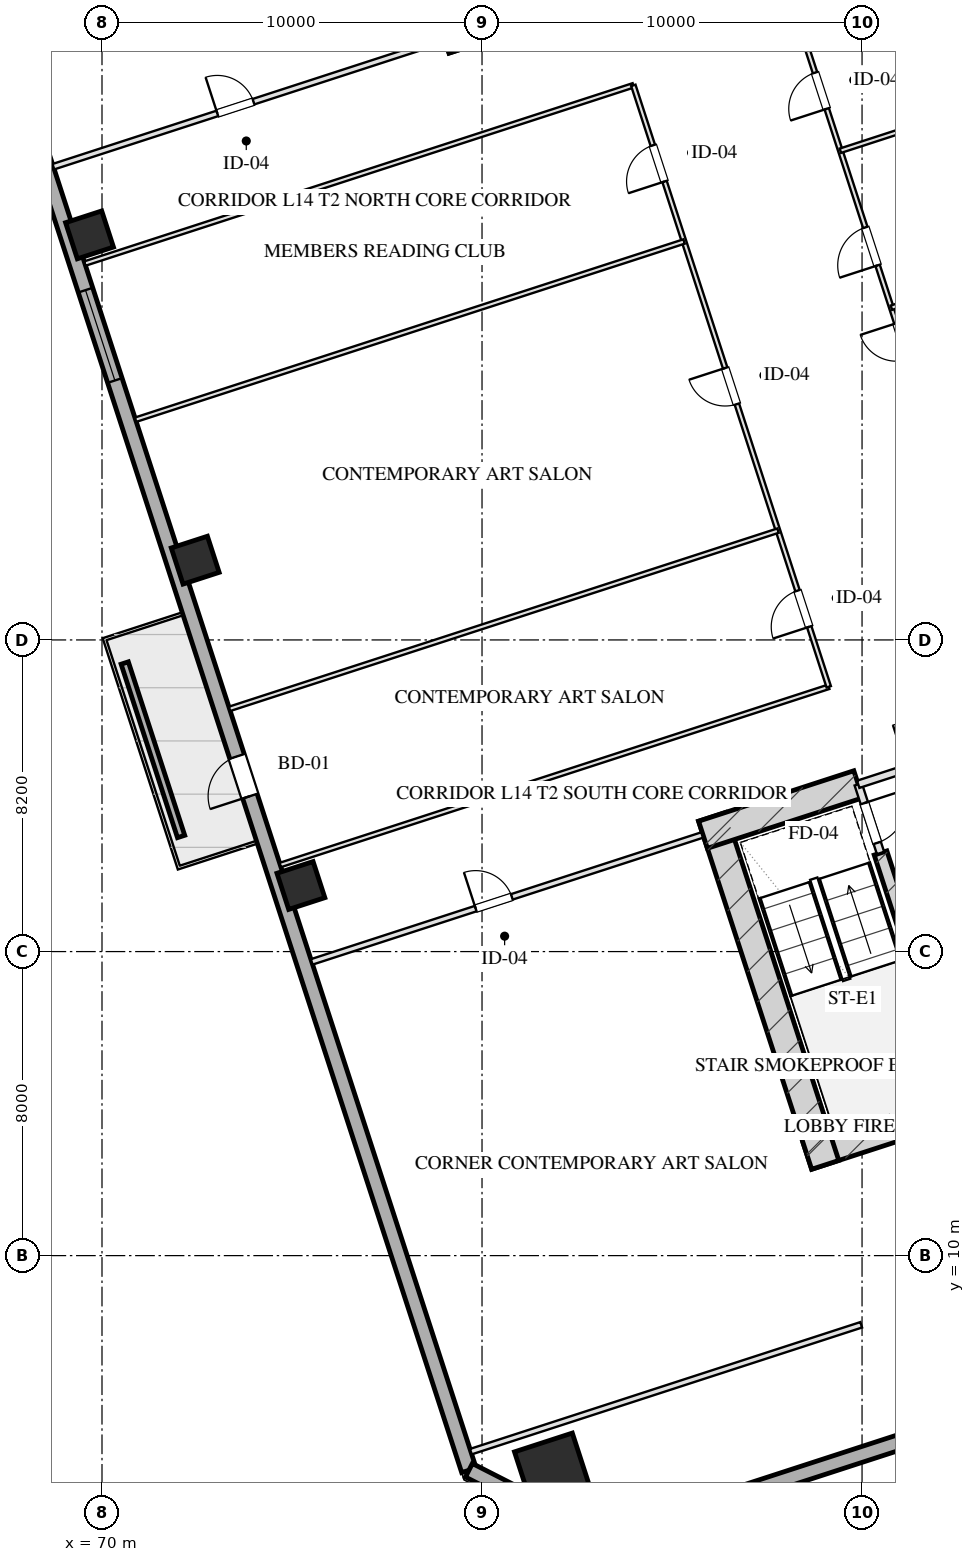
"""IFC4 building model, lengths in metres.
Left out: names, types, materials, properties, quantities, classifications, styles, units other than length and angle.
Written with IfcOpenShell. Run it as: python <this file> out.ifc"""

import sys

from ifc_helpers import new_model, si_unit, direction, frame, frame_2d, origin, origin_2d, place, context, subcontext, project, spatial, rectangle, hollow_rectangle, extrude, element, fill, save


model = new_model("IFC4")
c1 = context("Model", 3, precision=1e-05, world=origin(), true_north=direction((0.0, 1.0)))
c2 = subcontext(c1, "Body", "Model", "MODEL_VIEW")
j1 = project(units=[si_unit("LENGTHUNIT", "METRE"), si_unit("PLANEANGLEUNIT", "RADIAN")], contexts=[c1])
p1 = place(None, origin())
s1 = spatial("IfcSite", under=j1, at=p1, CompositionType="ELEMENT")
p2 = place(p1, origin())
s2 = spatial("IfcBuilding", under=s1, at=p2, CompositionType="ELEMENT")
p3 = place(p2, frame((0.0, 0.0, 60.95)))
s3 = spatial("IfcBuildingStorey", under=s2, at=p3, CompositionType="ELEMENT", Elevation=60.95)
p4 = place(p3, frame((88.559, 12.629, 0.0), z_axis=(0.0, 0.0, 1.0), x_axis=(0.951056072937, 0.309018358888, 0.0)))
e1 = element("IfcWall", 1, at=p4, inside=s3, PredefinedType="SHEAR", context=c2, shape_type="SweptSolid", body=[
    extrude(rectangle(XDim=16.55, YDim=0.75, at=frame_2d((8.275, 0.0))), origin(), (0.0, 0.0, 1.0), 3.45),
])
p5 = place(p3, frame((86.055, 21.546, 0.0), z_axis=(0.0, 0.0, 1.0), x_axis=(0.309023585745, -0.951054374604, 0.0)))
e2 = element("IfcWall", 2, at=p5, inside=s3, PredefinedType="SHEAR", context=c2, shape_type="SweptSolid", body=[
    extrude(rectangle(XDim=9.63, YDim=0.75, at=frame_2d((4.815, 0.0))), origin(), (0.0, 0.0, 1.0), 3.45),
])
p6 = place(p3, frame((90.486, 20.594, 0.0), z_axis=(0.0, 0.0, 1.0), x_axis=(0.309020428229, -0.951055400562, 0.0)))
e3 = element("IfcWall", 3, at=p6, inside=s3, PredefinedType="SHEAR", context=c2, shape_type="SweptSolid", body=[
    extrude(rectangle(XDim=6.98, YDim=0.35, at=frame_2d((3.49, 0.0))), origin(), (0.0, 0.0, 1.0), 3.45),
])
p7 = place(p3, frame((85.814, 21.074, 0.0), z_axis=(0.0, 0.0, 1.0), x_axis=(0.95106580992, 0.308988390074, 0.0)))
e4 = element("IfcWall", 4, at=p7, inside=s3, PredefinedType="SHEAR", context=c2, shape_type="SweptSolid", body=[
    extrude(rectangle(XDim=4.295, YDim=0.75, at=frame_2d((2.147, 0.0))), origin(), (0.0, 0.0, 1.0), 3.45),
])
p8 = place(p3, frame((79.489, 41.756, 0.0), z_axis=(0.0, 0.0, 1.0), x_axis=(-0.309016134813, 0.951056795583, 0.0)))
e5 = element("IfcWall", 5, at=p8, inside=s3, PredefinedType="SHEAR", context=c2, shape_type="SweptSolid", body=[
    extrude(rectangle(XDim=9.63, YDim=0.75, at=frame_2d((4.815, 0.0))), origin(), (0.0, 0.0, 1.0), 3.45),
])
p9 = place(p3, frame((79.016, 41.997, 0.0), z_axis=(0.0, 0.0, 1.0), x_axis=(0.95106038264, 0.309005094736, 0.0)))
e6 = element("IfcWall", 6, at=p9, inside=s3, PredefinedType="SHEAR", context=c2, shape_type="SweptSolid", body=[
    extrude(rectangle(XDim=4.295, YDim=0.75, at=frame_2d((2.147, 0.0))), origin(), (0.0, 0.0, 1.0), 3.45),
])
p10 = place(p3, frame((81.863, 4.323, 0.0), z_axis=(0.0, 0.0, 1.0), x_axis=(0.951056516295, 0.309016994375, 0.0)))
e7 = element("IfcColumn", 7, at=p10, inside=s3, PredefinedType="COLUMN", context=c2, shape_type="SweptSolid", body=[
    extrude(hollow_rectangle(XDim=1.6, YDim=1.6, WallThickness=0.055, at=origin_2d()), origin(), (0.0, 0.0, 1.0), 3.451),
])
for number, where, z_axis, x_axis in (
    (8, (75.234, 19.739, 0.0), (0.0, 0.0, 1.0), (0.951, 0.309, 0.0)),
    (9, (72.453, 28.299, 0.0), (0.0, 0.0, 1.0), (0.951, 0.309, 0.0)),
    (10, (69.672, 36.858, 0.0), (0.0, 0.0, 1.0), (0.951, 0.309, 0.0)),
):
    element("IfcColumn", number, at=place(p3, frame(where, z_axis=z_axis, x_axis=x_axis)), inside=s3, PredefinedType="COLUMN", context=c2, shape_type="SweptSolid", body=[
        extrude(hollow_rectangle(XDim=1.0, YDim=1.0, WallThickness=0.036, at=origin_2d()), origin(), (0.0, 0.0, 1.0), 3.451),
    ])
p11 = place(p3, frame((79.655, 4.352, 0.0), z_axis=(0.0, 0.0, 1.0), x_axis=(-0.309014526607, 0.951057318118, 0.0)))
e11 = element("IfcWall", 11, at=p11, inside=s3, PredefinedType="SOLIDWALL", context=c2, shape_type="SweptSolid", body=[
    extrude(rectangle(XDim=50.0, YDim=0.4, at=frame_2d((25.0, 0.0))), origin(), (0.0, 0.0, 1.0), 2.61),
])
p12 = place(p11, frame((30.15, 0.0, 0.75)))
e12 = element("IfcOpeningElement", 12, at=p12, cuts=e11, PredefinedType="OPENING", context=c2, shape_type="SweptSolid", body=[
    extrude(rectangle(XDim=2.5, YDim=1.46, at=frame_2d((1.25, 0.73))), frame((0.0, 0.21, 0.0), z_axis=(0.0, -1.0, 0.0), x_axis=(1.0, 0.0, 0.0)), (0.0, 0.0, 1.0), 0.42),
])
p13 = place(p11, frame((18.65, 0.0, 0.0)))
e13 = element("IfcOpeningElement", 13, at=p13, cuts=e11, PredefinedType="OPENING", context=c2, shape_type="SweptSolid", body=[
    extrude(rectangle(XDim=1.1, YDim=2.15, at=frame_2d((0.55, 1.075))), frame((0.0, 0.21, 0.0), z_axis=(0.0, -1.0, 0.0), x_axis=(1.0, 0.0, 0.0)), (0.0, 0.0, 1.0), 0.42),
])
p14 = place(p3, frame((113.998, 12.567, 0.0), z_axis=(0.0, 0.0, 1.0), x_axis=(-0.951055939317, -0.309018770125, 0.0)))
e14 = element("IfcWall", 14, at=p14, inside=s3, PredefinedType="SOLIDWALL", context=c2, shape_type="SweptSolid", body=[
    extrude(rectangle(XDim=32.4, YDim=0.4, at=frame_2d((16.2, 0.0))), origin(), (0.0, 0.0, 1.0), 2.61),
])
p15 = place(p3, frame((83.184, 2.554, 0.0), z_axis=(0.0, 0.0, 1.0), x_axis=(-0.890998089617, 0.454007053137, 0.0)))
e15 = element("IfcWall", 15, at=p15, inside=s3, PredefinedType="SOLIDWALL", context=c2, shape_type="SweptSolid", body=[
    extrude(rectangle(XDim=3.96, YDim=0.4, at=frame_2d((1.98, 0.0))), origin(), (0.0, 0.0, 1.0), 2.61),
])
p16 = place(p3, frame((72.082, 21.028, 0.0), z_axis=(0.0, 0.0, 1.0), x_axis=(-0.30900096172, 0.951061725471, 0.0)))
e16 = element("IfcWall", 16, at=p16, inside=s3, PredefinedType="PARAPET", context=c2, shape_type="SweptSolid", body=[
    extrude(rectangle(XDim=4.8, YDim=0.2, at=frame_2d((2.4, 0.0))), origin(), (0.0, 0.0, 1.0), 0.75),
])
p17 = place(p3, frame((89.899, 22.401, 0.0), z_axis=(0.0, 0.0, 1.0), x_axis=(0.308932062672, -0.951084108086, 0.0)))
e17 = element("IfcWall", 17, at=p17, inside=s3, PredefinedType="PARTITIONING", context=c2, shape_type="SweptSolid", body=[
    extrude(rectangle(XDim=1.9, YDim=0.2, at=frame_2d((0.95, 0.0))), origin(), (0.0, 0.0, 1.0), 3.175),
])
p18 = place(p17, frame((0.52, 0.0, 0.0)))
e18 = element("IfcOpeningElement", 18, at=p18, cuts=e17, PredefinedType="OPENING", context=c2, shape_type="SweptSolid", body=[
    extrude(rectangle(XDim=1.1, YDim=2.05, at=frame_2d((0.55, 1.025))), frame((0.0, 0.11, 0.0), z_axis=(0.0, -1.0, 0.0), x_axis=(1.0, 0.0, 0.0)), (0.0, 0.0, 1.0), 0.22),
])
p19 = place(p3, frame((89.899, 22.401, 0.0), z_axis=(0.0, 0.0, 1.0), x_axis=(0.951046716504, 0.309047153403, 0.0)))
e19 = element("IfcWall", 19, at=p19, inside=s3, PredefinedType="PARTITIONING", context=c2, shape_type="SweptSolid", body=[
    extrude(rectangle(XDim=3.83, YDim=0.2, at=frame_2d((1.915, 0.0))), origin(), (0.0, 0.0, 1.0), 3.175),
])
p20 = place(p19, frame((1.35, 0.0, 0.0)))
e20 = element("IfcOpeningElement", 20, at=p20, cuts=e19, PredefinedType="OPENING", context=c2, shape_type="SweptSolid", body=[
    extrude(rectangle(XDim=1.2, YDim=2.05, at=frame_2d((0.6, 1.025))), frame((0.0, 0.11, 0.0), z_axis=(0.0, -1.0, 0.0), x_axis=(1.0, 0.0, 0.0)), (0.0, 0.0, 1.0), 0.22),
])
p21 = place(p3, frame((79.707, 4.842, 0.0), z_axis=(0.0, 0.0, 1.0), x_axis=(0.951056658866, 0.309016555588, 0.0)))
e21 = element("IfcWall", 21, at=p21, inside=s3, PredefinedType="PARTITIONING", context=c2, shape_type="SweptSolid", body=[
    extrude(rectangle(XDim=10.8, YDim=0.15, at=frame_2d((5.4, 0.0))), origin(), (0.0, 0.0, 1.0), 3.175),
])
p22 = place(p3, frame((75.519, 17.729, 0.0), z_axis=(0.0, 0.0, 1.0), x_axis=(0.951056658866, 0.309016555588, 0.0)))
e22 = element("IfcWall", 22, at=p22, inside=s3, PredefinedType="PARTITIONING", context=c2, shape_type="SweptSolid", body=[
    extrude(rectangle(XDim=10.8, YDim=0.15, at=frame_2d((5.4, 0.0))), origin(), (0.0, 0.0, 1.0), 3.175),
])
p23 = place(p22, frame((4.536, 0.0, 0.0)))
e23 = element("IfcOpeningElement", 23, at=p23, cuts=e22, PredefinedType="OPENING", context=c2, shape_type="SweptSolid", body=[
    extrude(rectangle(XDim=1.0, YDim=2.05, at=frame_2d((0.5, 1.025))), frame((0.0, 0.085, 0.0), z_axis=(0.0, -1.0, 0.0), x_axis=(1.0, 0.0, 0.0)), (0.0, 0.0, 1.0), 0.17),
])
p24 = place(p3, frame((68.721, 38.652, 0.0), z_axis=(0.0, 0.0, 1.0), x_axis=(0.951056658866, 0.309016555588, 0.0)))
e24 = element("IfcWall", 24, at=p24, inside=s3, PredefinedType="PARTITIONING", context=c2, shape_type="SweptSolid", body=[
    extrude(rectangle(XDim=10.8, YDim=0.15, at=frame_2d((5.4, 0.0))), origin(), (0.0, 0.0, 1.0), 3.175),
])
p25 = place(p24, frame((4.536, 0.0, 0.0)))
e25 = element("IfcOpeningElement", 25, at=p25, cuts=e24, PredefinedType="OPENING", context=c2, shape_type="SweptSolid", body=[
    extrude(rectangle(XDim=1.0, YDim=2.05, at=frame_2d((0.5, 1.025))), frame((0.0, 0.085, 0.0), z_axis=(0.0, -1.0, 0.0), x_axis=(1.0, 0.0, 0.0)), (0.0, 0.0, 1.0), 0.17),
])
for number, where, z_axis, x_axis in (
    (26, (74.691, 20.278, 0.0), (0.0, 0.0, 1.0), (0.951, 0.309, 0.0)),
    (27, (69.549, 36.103, 0.0), (0.0, 0.0, 1.0), (0.951, 0.309, 0.0)),
):
    element("IfcWall", number, at=place(p3, frame(where, z_axis=z_axis, x_axis=x_axis)), inside=s3, PredefinedType="PARTITIONING", context=c2, shape_type="SweptSolid", body=[
        extrude(rectangle(XDim=15.175, YDim=0.12, at=frame_2d((7.587, 0.0))), origin(), (0.0, 0.0, 1.0), 3.175),
    ])
p26 = place(p3, frame((89.124, 24.967, 0.0), z_axis=(0.0, 0.0, 1.0), x_axis=(-0.30901773025, 0.951056277195, 0.0)))
e28 = element("IfcWall", 28, at=p26, inside=s3, PredefinedType="PARTITIONING", context=c2, shape_type="SweptSolid", body=[
    extrude(rectangle(XDim=16.64, YDim=0.12, at=frame_2d((8.32, 0.0))), origin(), (0.0, 0.0, 1.0), 3.175),
])
p27 = place(p26, frame((1.66, 0.0, 0.0)))
e29 = element("IfcOpeningElement", 29, at=p27, cuts=e28, PredefinedType="OPENING", context=c2, shape_type="SweptSolid", body=[
    extrude(rectangle(XDim=1.0, YDim=2.05, at=frame_2d((0.5, 1.025))), frame((0.0, 0.07, 0.0), z_axis=(0.0, -1.0, 0.0), x_axis=(1.0, 0.0, 0.0)), (0.0, 0.0, 1.0), 0.14),
])
p28 = place(p26, frame((7.82, 0.0, 0.0)))
e30 = element("IfcOpeningElement", 30, at=p28, cuts=e28, PredefinedType="OPENING", context=c2, shape_type="SweptSolid", body=[
    extrude(rectangle(XDim=1.0, YDim=2.05, at=frame_2d((0.5, 1.025))), frame((0.0, 0.07, 0.0), z_axis=(0.0, -1.0, 0.0), x_axis=(1.0, 0.0, 0.0)), (0.0, 0.0, 1.0), 0.14),
])
p29 = place(p26, frame((13.98, 0.0, 0.0)))
e31 = element("IfcOpeningElement", 31, at=p29, cuts=e28, PredefinedType="OPENING", context=c2, shape_type="SweptSolid", body=[
    extrude(rectangle(XDim=1.0, YDim=2.05, at=frame_2d((0.5, 1.025))), frame((0.0, 0.07, 0.0), z_axis=(0.0, -1.0, 0.0), x_axis=(1.0, 0.0, 0.0)), (0.0, 0.0, 1.0), 0.14),
])
p30 = place(p3, frame((93.546, 26.404, 0.0), z_axis=(0.0, 0.0, 1.0), x_axis=(-0.309022042254, 0.951054876125, 0.0)))
e32 = element("IfcWall", 32, at=p30, inside=s3, PredefinedType="PARTITIONING", context=c2, shape_type="SweptSolid", body=[
    extrude(rectangle(XDim=16.64, YDim=0.12, at=frame_2d((8.32, 0.0))), origin(), (0.0, 0.0, 1.0), 3.175),
])
p31 = place(p30, frame((1.16, 0.0, 0.0)))
e33 = element("IfcOpeningElement", 33, at=p31, cuts=e32, PredefinedType="OPENING", context=c2, shape_type="SweptSolid", body=[
    extrude(rectangle(XDim=1.0, YDim=2.05, at=frame_2d((0.5, 1.025))), frame((0.0, 0.07, 0.0), z_axis=(0.0, -1.0, 0.0), x_axis=(1.0, 0.0, 0.0)), (0.0, 0.0, 1.0), 0.14),
])
p32 = place(p30, frame((4.72, 0.0, 0.0)))
e34 = element("IfcOpeningElement", 34, at=p32, cuts=e32, PredefinedType="OPENING", context=c2, shape_type="SweptSolid", body=[
    extrude(rectangle(XDim=0.85, YDim=2.05, at=frame_2d((0.425, 1.025))), frame((0.0, 0.07, 0.0), z_axis=(0.0, -1.0, 0.0), x_axis=(1.0, 0.0, 0.0)), (0.0, 0.0, 1.0), 0.14),
])
p33 = place(p30, frame((7.549, 0.0, 0.0)))
e35 = element("IfcOpeningElement", 35, at=p33, cuts=e32, PredefinedType="OPENING", context=c2, shape_type="SweptSolid", body=[
    extrude(rectangle(XDim=1.0, YDim=2.05, at=frame_2d((0.5, 1.025))), frame((0.0, 0.07, 0.0), z_axis=(0.0, -1.0, 0.0), x_axis=(1.0, 0.0, 0.0)), (0.0, 0.0, 1.0), 0.14),
])
p34 = place(p30, frame((10.148, 0.0, 0.0)))
e36 = element("IfcOpeningElement", 36, at=p34, cuts=e32, PredefinedType="OPENING", context=c2, shape_type="SweptSolid", body=[
    extrude(rectangle(XDim=1.05, YDim=2.05, at=frame_2d((0.525, 1.025))), frame((0.0, 0.07, 0.0), z_axis=(0.0, -1.0, 0.0), x_axis=(1.0, 0.0, 0.0)), (0.0, 0.0, 1.0), 0.14),
])
p35 = place(p30, frame((14.48, 0.0, 0.0)))
e37 = element("IfcOpeningElement", 37, at=p35, cuts=e32, PredefinedType="OPENING", context=c2, shape_type="SweptSolid", body=[
    extrude(rectangle(XDim=1.0, YDim=2.05, at=frame_2d((0.5, 1.025))), frame((0.0, 0.07, 0.0), z_axis=(0.0, -1.0, 0.0), x_axis=(1.0, 0.0, 0.0)), (0.0, 0.0, 1.0), 0.14),
])
for number, where, z_axis, x_axis in (
    (38, (73.356, 24.386, 0.0), (0.0, 0.0, 1.0), (0.951, 0.309, 0.0)),
    (39, (70.884, 31.995, 0.0), (0.0, 0.0, 1.0), (0.951, 0.309, 0.0)),
):
    element("IfcWall", number, at=place(p3, frame(where, z_axis=z_axis, x_axis=x_axis)), inside=s3, PredefinedType="PARTITIONING", context=c2, shape_type="SweptSolid", body=[
        extrude(rectangle(XDim=15.175, YDim=0.12, at=frame_2d((7.587, 0.0))), origin(), (0.0, 0.0, 1.0), 3.175),
    ])
for number, where, z_axis, x_axis in (
    (40, (90.772, 34.942, 0.0), (0.0, 0.0, 1.0), (0.951, 0.309, 0.0)),
    (41, (89.43, 39.072, 0.0), (0.0, 0.0, 1.0), (0.951, 0.309, 0.0)),
):
    element("IfcWall", number, at=place(p3, frame(where, z_axis=z_axis, x_axis=x_axis)), inside=s3, PredefinedType="PARTITIONING", context=c2, shape_type="SweptSolid", body=[
        extrude(rectangle(XDim=17.775, YDim=0.12, at=frame_2d((8.887, 0.0))), origin(), (0.0, 0.0, 1.0), 3.175),
    ])
p36 = place(p12, origin())
e42 = element("IfcWindow", 42, at=p36, inside=s3, PartitioningType="TRIPLE_PANEL_VERTICAL", PredefinedType="WINDOW", context=c2, shape_type="SweptSolid", body=[
    extrude(rectangle(XDim=2.5, YDim=1.46, at=frame_2d((1.25, 0.73))), frame((0.0, 0.03, 0.0), z_axis=(0.0, -1.0, 0.0), x_axis=(1.0, 0.0, 0.0)), (0.0, 0.0, 1.0), 0.06),
])
fill(e12, e42)
p37 = place(p13, origin())
e43 = element("IfcDoor", 43, at=p37, inside=s3, OperationType="SINGLE_SWING_LEFT", PredefinedType="DOOR", context=c2, shape_type="SweptSolid", body=[
    extrude(rectangle(XDim=1.1, YDim=2.15, at=frame_2d((0.55, 1.075))), frame((0.0, 0.025, 0.0), z_axis=(0.0, -1.0, 0.0), x_axis=(1.0, 0.0, 0.0)), (0.0, 0.0, 1.0), 0.05),
])
fill(e13, e43)
p38 = place(p18, origin())
e44 = element("IfcDoor", 44, at=p38, inside=s3, OperationType="SINGLE_SWING_LEFT", PredefinedType="DOOR", context=c2, shape_type="SweptSolid", body=[
    extrude(rectangle(XDim=1.1, YDim=2.05, at=frame_2d((0.55, 1.025))), frame((0.0, 0.025, 0.0), z_axis=(0.0, -1.0, 0.0), x_axis=(1.0, 0.0, 0.0)), (0.0, 0.0, 1.0), 0.05),
])
fill(e18, e44)
p39 = place(p23, origin())
e45 = element("IfcDoor", 45, at=p39, inside=s3, OperationType="SINGLE_SWING_LEFT", PredefinedType="DOOR", context=c2, shape_type="SweptSolid", body=[
    extrude(rectangle(XDim=1.0, YDim=2.05, at=frame_2d((0.5, 1.025))), frame((0.0, 0.025, 0.0), z_axis=(0.0, -1.0, 0.0), x_axis=(1.0, 0.0, 0.0)), (0.0, 0.0, 1.0), 0.05),
])
fill(e23, e45)
p40 = place(p25, origin())
e46 = element("IfcDoor", 46, at=p40, inside=s3, OperationType="SINGLE_SWING_LEFT", PredefinedType="DOOR", context=c2, shape_type="SweptSolid", body=[
    extrude(rectangle(XDim=1.0, YDim=2.05, at=frame_2d((0.5, 1.025))), frame((0.0, 0.025, 0.0), z_axis=(0.0, -1.0, 0.0), x_axis=(1.0, 0.0, 0.0)), (0.0, 0.0, 1.0), 0.05),
])
fill(e25, e46)
p41 = place(p27, origin())
e47 = element("IfcDoor", 47, at=p41, inside=s3, OperationType="SINGLE_SWING_LEFT", PredefinedType="DOOR", context=c2, shape_type="SweptSolid", body=[
    extrude(rectangle(XDim=1.0, YDim=2.05, at=frame_2d((0.5, 1.025))), frame((0.0, 0.025, 0.0), z_axis=(0.0, -1.0, 0.0), x_axis=(1.0, 0.0, 0.0)), (0.0, 0.0, 1.0), 0.05),
])
fill(e29, e47)
p42 = place(p28, origin())
e48 = element("IfcDoor", 48, at=p42, inside=s3, OperationType="SINGLE_SWING_RIGHT", PredefinedType="DOOR", context=c2, shape_type="SweptSolid", body=[
    extrude(rectangle(XDim=1.0, YDim=2.05, at=frame_2d((0.5, 1.025))), frame((0.0, 0.025, 0.0), z_axis=(0.0, -1.0, 0.0), x_axis=(1.0, 0.0, 0.0)), (0.0, 0.0, 1.0), 0.05),
])
fill(e30, e48)
p43 = place(p29, origin())
e49 = element("IfcDoor", 49, at=p43, inside=s3, OperationType="SINGLE_SWING_LEFT", PredefinedType="DOOR", context=c2, shape_type="SweptSolid", body=[
    extrude(rectangle(XDim=1.0, YDim=2.05, at=frame_2d((0.5, 1.025))), frame((0.0, 0.025, 0.0), z_axis=(0.0, -1.0, 0.0), x_axis=(1.0, 0.0, 0.0)), (0.0, 0.0, 1.0), 0.05),
])
fill(e31, e49)
p44 = place(p34, origin())
e50 = element("IfcDoor", 50, at=p44, inside=s3, OperationType="SINGLE_SWING_LEFT", PredefinedType="DOOR", context=c2, shape_type="SweptSolid", body=[
    extrude(rectangle(XDim=1.05, YDim=2.05, at=frame_2d((0.525, 1.025))), frame((0.0, 0.025, 0.0), z_axis=(0.0, -1.0, 0.0), x_axis=(1.0, 0.0, 0.0)), (0.0, 0.0, 1.0), 0.05),
])
fill(e36, e50)
p45 = place(p35, origin())
e51 = element("IfcDoor", 51, at=p45, inside=s3, OperationType="SINGLE_SWING_LEFT", PredefinedType="DOOR", context=c2, shape_type="SweptSolid", body=[
    extrude(rectangle(XDim=1.0, YDim=2.05, at=frame_2d((0.5, 1.025))), frame((0.0, 0.025, 0.0), z_axis=(0.0, -1.0, 0.0), x_axis=(1.0, 0.0, 0.0)), (0.0, 0.0, 1.0), 0.05),
])
fill(e37, e51)
save(model, sys.argv[1])
